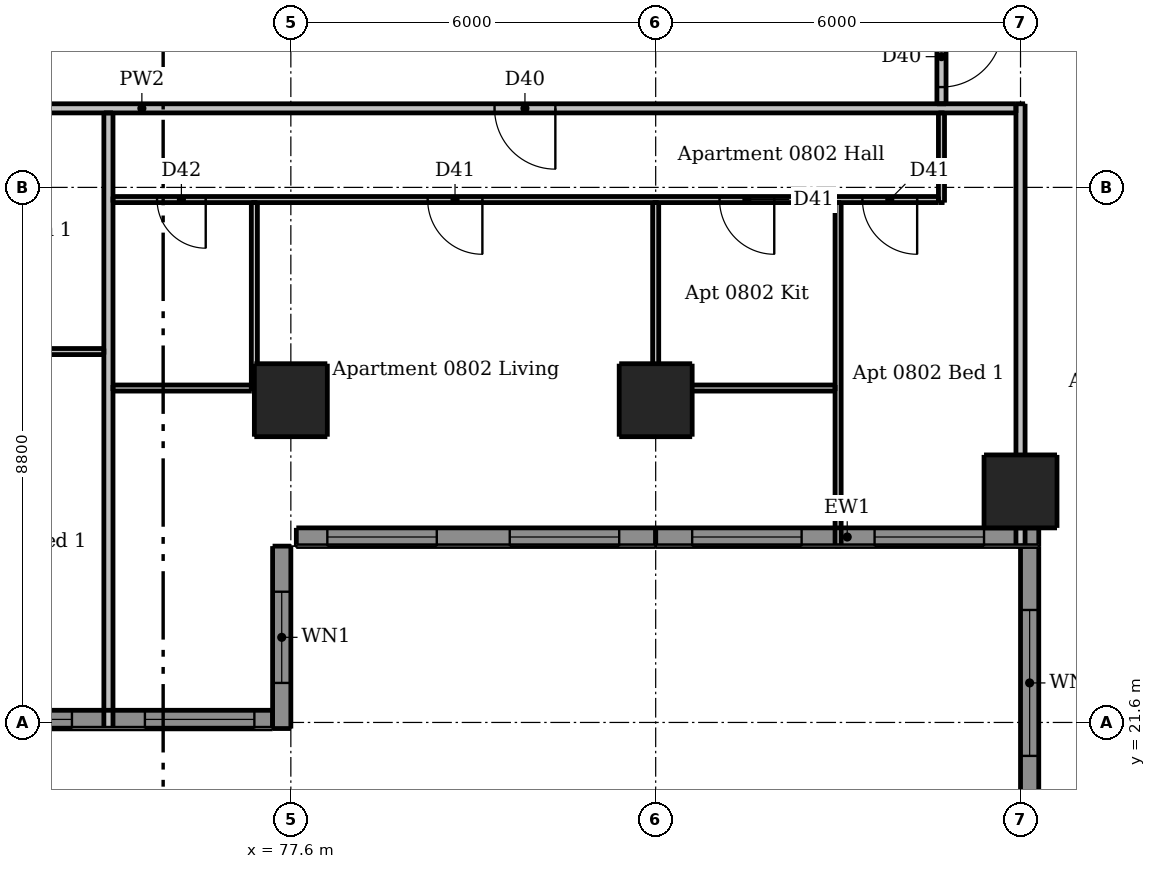
"""IFC4 building model, lengths in metres.
Left out: names, types, materials, properties, quantities, classifications, styles, units other than length and angle.
Written with IfcOpenShell. Run it as: python <this file> out.ifc"""

import sys

from ifc_helpers import new_model, si_unit, direction, frame, frame_2d, origin, origin_2d, place, context, subcontext, project, spatial, rectangle, extrude, element, fill, save


model = new_model("IFC4")
c1 = context("Model", 3, precision=1e-05, world=origin(), true_north=direction((0.0, 1.0)))
c2 = subcontext(c1, "Body", "Model", "MODEL_VIEW")
j1 = project(units=[si_unit("LENGTHUNIT", "METRE"), si_unit("PLANEANGLEUNIT", "RADIAN")], contexts=[c1])
p1 = place(None, origin())
s1 = spatial("IfcSite", under=j1, at=p1, CompositionType="ELEMENT")
p2 = place(p1, origin())
s2 = spatial("IfcBuilding", under=s1, at=p2, CompositionType="ELEMENT")
p3 = place(p2, frame((0.0, 0.0, 33.4)))
s3 = spatial("IfcBuildingStorey", under=s2, at=p3, CompositionType="ELEMENT", Elevation=33.4)
for number, where, z_axis, x_axis in (
    (1, (77.6, 26.9, 0.0), (0.0, 0.0, 1.0), (1.0, 0.0, 0.0)),
    (2, (83.6, 26.9, 0.0), (0.0, 0.0, 1.0), (1.0, 0.0, 0.0)),
    (3, (89.6, 25.4, 0.0), (0.0, 0.0, 1.0), (1.0, 0.0, 0.0)),
):
    element("IfcColumn", number, at=place(p3, frame(where, z_axis=z_axis, x_axis=x_axis)), inside=s3, PredefinedType="COLUMN", context=c2, shape_type="SweptSolid", body=[
        extrude(rectangle(XDim=1.2, YDim=1.2, at=origin_2d()), origin(), (0.0, 0.0, 1.0), 3.05),
    ])
p4 = place(p3, frame((77.45, 21.5, 0.0), z_axis=(0.0, 0.0, 1.0), x_axis=(0.0, 1.0, 0.0)))
e4 = element("IfcWall", 4, at=p4, inside=s3, PredefinedType="SOLIDWALL", context=c2, shape_type="SweptSolid", body=[
    extrude(rectangle(XDim=3.0, YDim=0.3, at=frame_2d((1.5, 0.0))), origin(), (0.0, 0.0, 1.0), 3.05),
])
p5 = place(p4, frame((0.75, 0.0, 0.9)))
e5 = element("IfcOpeningElement", 5, at=p5, cuts=e4, PredefinedType="OPENING", context=c2, shape_type="SweptSolid", body=[
    extrude(rectangle(XDim=1.5, YDim=1.5, at=frame_2d((0.75, 0.75))), frame((0.0, 0.16, 0.0), z_axis=(0.0, -1.0, 0.0), x_axis=(1.0, 0.0, 0.0)), (0.0, 0.0, 1.0), 0.32),
])
p6 = place(p3, frame((89.75, 24.5, 0.0), z_axis=(0.0, 0.0, 1.0), x_axis=(0.0, -1.0, 0.0)))
e6 = element("IfcWall", 6, at=p6, inside=s3, PredefinedType="SOLIDWALL", context=c2, shape_type="SweptSolid", body=[
    extrude(rectangle(XDim=4.5, YDim=0.3, at=frame_2d((2.25, 0.0))), origin(), (0.0, 0.0, 1.0), 3.05),
])
p7 = place(p6, frame((1.05, 0.0, 0.15)))
e7 = element("IfcOpeningElement", 7, at=p7, cuts=e6, PredefinedType="OPENING", context=c2, shape_type="SweptSolid", body=[
    extrude(rectangle(XDim=2.4, YDim=2.1, at=frame_2d((1.2, 1.05))), frame((0.0, 0.16, 0.0), z_axis=(0.0, -1.0, 0.0), x_axis=(1.0, 0.0, 0.0)), (0.0, 0.0, 1.0), 0.32),
])
p8 = place(p3, frame((71.6, 21.65, 0.0), z_axis=(0.0, 0.0, 1.0), x_axis=(1.0, 0.0, 0.0)))
e8 = element("IfcWall", 8, at=p8, inside=s3, PredefinedType="SOLIDWALL", context=c2, shape_type="SweptSolid", body=[
    extrude(rectangle(XDim=5.7, YDim=0.3, at=frame_2d((2.85, 0.0))), origin(), (0.0, 0.0, 1.0), 3.05),
])
p9 = place(p8, frame((0.6, 0.0, 0.15)))
e9 = element("IfcOpeningElement", 9, at=p9, cuts=e8, PredefinedType="OPENING", context=c2, shape_type="SweptSolid", body=[
    extrude(rectangle(XDim=1.8, YDim=2.1, at=frame_2d((0.9, 1.05))), frame((0.0, 0.16, 0.0), z_axis=(0.0, -1.0, 0.0), x_axis=(1.0, 0.0, 0.0)), (0.0, 0.0, 1.0), 0.32),
])
p10 = place(p8, frame((3.6, 0.0, 0.15)))
e10 = element("IfcOpeningElement", 10, at=p10, cuts=e8, PredefinedType="OPENING", context=c2, shape_type="SweptSolid", body=[
    extrude(rectangle(XDim=1.8, YDim=2.1, at=frame_2d((0.9, 1.05))), frame((0.0, 0.16, 0.0), z_axis=(0.0, -1.0, 0.0), x_axis=(1.0, 0.0, 0.0)), (0.0, 0.0, 1.0), 0.32),
])
p11 = place(p3, frame((77.69, 24.65, 0.0), z_axis=(0.0, 0.0, 1.0), x_axis=(1.0, 0.0, 0.0)))
e11 = element("IfcWall", 11, at=p11, inside=s3, PredefinedType="SOLIDWALL", context=c2, shape_type="SweptSolid", body=[
    extrude(rectangle(XDim=5.91, YDim=0.3, at=frame_2d((2.955, 0.0))), origin(), (0.0, 0.0, 1.0), 3.05),
])
p12 = place(p11, frame((0.51, 0.0, 0.15)))
e12 = element("IfcOpeningElement", 12, at=p12, cuts=e11, PredefinedType="OPENING", context=c2, shape_type="SweptSolid", body=[
    extrude(rectangle(XDim=1.8, YDim=2.1, at=frame_2d((0.9, 1.05))), frame((0.0, 0.16, 0.0), z_axis=(0.0, -1.0, 0.0), x_axis=(1.0, 0.0, 0.0)), (0.0, 0.0, 1.0), 0.32),
])
p13 = place(p11, frame((3.51, 0.0, 0.15)))
e13 = element("IfcOpeningElement", 13, at=p13, cuts=e11, PredefinedType="OPENING", context=c2, shape_type="SweptSolid", body=[
    extrude(rectangle(XDim=1.8, YDim=2.1, at=frame_2d((0.9, 1.05))), frame((0.0, 0.16, 0.0), z_axis=(0.0, -1.0, 0.0), x_axis=(1.0, 0.0, 0.0)), (0.0, 0.0, 1.0), 0.32),
])
p14 = place(p3, frame((83.6, 24.65, 0.0), z_axis=(0.0, 0.0, 1.0), x_axis=(1.0, 0.0, 0.0)))
e14 = element("IfcWall", 14, at=p14, inside=s3, PredefinedType="SOLIDWALL", context=c2, shape_type="SweptSolid", body=[
    extrude(rectangle(XDim=6.3, YDim=0.3, at=frame_2d((3.15, 0.0))), origin(), (0.0, 0.0, 1.0), 3.05),
])
p15 = place(p14, frame((0.6, 0.0, 0.15)))
e15 = element("IfcOpeningElement", 15, at=p15, cuts=e14, PredefinedType="OPENING", context=c2, shape_type="SweptSolid", body=[
    extrude(rectangle(XDim=1.8, YDim=2.1, at=frame_2d((0.9, 1.05))), frame((0.0, 0.16, 0.0), z_axis=(0.0, -1.0, 0.0), x_axis=(1.0, 0.0, 0.0)), (0.0, 0.0, 1.0), 0.32),
])
p16 = place(p14, frame((3.6, 0.0, 0.15)))
e16 = element("IfcOpeningElement", 16, at=p16, cuts=e14, PredefinedType="OPENING", context=c2, shape_type="SweptSolid", body=[
    extrude(rectangle(XDim=1.8, YDim=2.1, at=frame_2d((0.9, 1.05))), frame((0.0, 0.16, 0.0), z_axis=(0.0, -1.0, 0.0), x_axis=(1.0, 0.0, 0.0)), (0.0, 0.0, 1.0), 0.32),
])
p17 = place(p3, frame((77.0, 27.05, 0.0), z_axis=(0.0, 0.0, 1.0), x_axis=(0.0, 1.0, 0.0)))
e17 = element("IfcWall", 17, at=p17, inside=s3, PredefinedType="PARTITIONING", context=c2, shape_type="SweptSolid", body=[
    extrude(rectangle(XDim=3.1, YDim=0.1, at=frame_2d((1.55, 0.0))), origin(), (0.0, 0.0, 1.0), 3.05),
])
p18 = place(p3, frame((83.6, 27.05, 0.0), z_axis=(0.0, 0.0, 1.0), x_axis=(0.0, 1.0, 0.0)))
e18 = element("IfcWall", 18, at=p18, inside=s3, PredefinedType="PARTITIONING", context=c2, shape_type="SweptSolid", body=[
    extrude(rectangle(XDim=3.1, YDim=0.1, at=frame_2d((1.55, 0.0))), origin(), (0.0, 0.0, 1.0), 2.647),
])
p19 = place(p3, frame((86.6, 24.5, 0.0), z_axis=(0.0, 0.0, 1.0), x_axis=(0.0, 1.0, 0.0)))
e19 = element("IfcWall", 19, at=p19, inside=s3, PredefinedType="PARTITIONING", context=c2, shape_type="SweptSolid", body=[
    extrude(rectangle(XDim=5.65, YDim=0.1, at=frame_2d((2.825, 0.0))), origin(), (0.0, 0.0, 1.0), 3.05),
])
p20 = place(p3, frame((88.3, 30.15, 0.0), z_axis=(0.0, 0.0, 1.0), x_axis=(0.0, 1.0, 0.0)))
e20 = element("IfcWall", 20, at=p20, inside=s3, PredefinedType="PARTITIONING", context=c2, shape_type="SweptSolid", body=[
    extrude(rectangle(XDim=1.475, YDim=0.1, at=frame_2d((0.738, 0.0))), origin(), (0.0, 0.0, 1.0), 3.05),
])
p21 = place(p3, frame((88.25, 30.2, 0.0), z_axis=(0.0, 0.0, 1.0), x_axis=(-1.0, 0.0, 0.0)))
e21 = element("IfcWall", 21, at=p21, inside=s3, PredefinedType="PARTITIONING", context=c2, shape_type="SweptSolid", body=[
    extrude(rectangle(XDim=13.575, YDim=0.1, at=frame_2d((6.788, 0.0))), origin(), (0.0, 0.0, 1.0), 3.05),
])
p22 = place(p21, frame((7.5, 0.0, 0.0)))
e22 = element("IfcOpeningElement", 22, at=p22, cuts=e21, PredefinedType="OPENING", context=c2, shape_type="SweptSolid", body=[
    extrude(rectangle(XDim=0.9, YDim=2.1, at=frame_2d((0.45, 1.05))), frame((0.0, 0.06, 0.0), z_axis=(0.0, -1.0, 0.0), x_axis=(1.0, 0.0, 0.0)), (0.0, 0.0, 1.0), 0.12),
])
p23 = place(p21, frame((2.7, 0.0, 0.0)))
e23 = element("IfcOpeningElement", 23, at=p23, cuts=e21, PredefinedType="OPENING", context=c2, shape_type="SweptSolid", body=[
    extrude(rectangle(XDim=0.9, YDim=2.1, at=frame_2d((0.45, 1.05))), frame((0.0, 0.06, 0.0), z_axis=(0.0, -1.0, 0.0), x_axis=(1.0, 0.0, 0.0)), (0.0, 0.0, 1.0), 0.12),
])
p24 = place(p21, frame((0.35, 0.0, 0.0)))
e24 = element("IfcOpeningElement", 24, at=p24, cuts=e21, PredefinedType="OPENING", context=c2, shape_type="SweptSolid", body=[
    extrude(rectangle(XDim=0.9, YDim=2.1, at=frame_2d((0.45, 1.05))), frame((0.0, 0.06, 0.0), z_axis=(0.0, -1.0, 0.0), x_axis=(1.0, 0.0, 0.0)), (0.0, 0.0, 1.0), 0.12),
])
p25 = place(p21, frame((12.05, 0.0, 0.0)))
e25 = element("IfcOpeningElement", 25, at=p25, cuts=e21, PredefinedType="OPENING", context=c2, shape_type="SweptSolid", body=[
    extrude(rectangle(XDim=0.8, YDim=2.1, at=frame_2d((0.4, 1.05))), frame((0.0, 0.06, 0.0), z_axis=(0.0, -1.0, 0.0), x_axis=(1.0, 0.0, 0.0)), (0.0, 0.0, 1.0), 0.12),
])
p26 = place(p3, frame((68.45, 27.7, 0.0), z_axis=(0.0, 0.0, 1.0), x_axis=(1.0, 0.0, 0.0)))
e26 = element("IfcWall", 26, at=p26, inside=s3, PredefinedType="PARTITIONING", context=c2, shape_type="SweptSolid", body=[
    extrude(rectangle(XDim=6.075, YDim=0.1, at=frame_2d((3.038, 0.0))), origin(), (0.0, 0.0, 1.0), 3.05),
])
p27 = place(p26, frame((3.85, 0.0, 0.0)))
e27 = element("IfcOpeningElement", 27, at=p27, cuts=e26, PredefinedType="OPENING", context=c2, shape_type="SweptSolid", body=[
    extrude(rectangle(XDim=0.8, YDim=2.1, at=frame_2d((0.4, 1.05))), frame((0.0, 0.06, 0.0), z_axis=(0.0, -1.0, 0.0), x_axis=(1.0, 0.0, 0.0)), (0.0, 0.0, 1.0), 0.12),
])
p28 = place(p3, frame((74.675, 27.1, 0.0), z_axis=(0.0, 0.0, 1.0), x_axis=(1.0, 0.0, 0.0)))
e28 = element("IfcWall", 28, at=p28, inside=s3, PredefinedType="PARTITIONING", context=c2, shape_type="SweptSolid", body=[
    extrude(rectangle(XDim=2.275, YDim=0.1, at=frame_2d((1.137, 0.0))), origin(), (0.0, 0.0, 1.0), 3.05),
])
p29 = place(p3, frame((83.65, 27.1, 0.0), z_axis=(0.0, 0.0, 1.0), x_axis=(1.0, 0.0, 0.0)))
e29 = element("IfcWall", 29, at=p29, inside=s3, PredefinedType="PARTITIONING", context=c2, shape_type="SweptSolid", body=[
    extrude(rectangle(XDim=2.9, YDim=0.1, at=frame_2d((1.45, 0.0))), origin(), (0.0, 0.0, 1.0), 3.05),
])
p30 = place(p3, frame((74.6, 21.5, 0.0), z_axis=(0.0, 0.0, 1.0), x_axis=(0.0, 1.0, 0.0)))
e30 = element("IfcWall", 30, at=p30, inside=s3, PredefinedType="PARTITIONING", context=c2, shape_type="SweptSolid", body=[
    extrude(rectangle(XDim=10.125, YDim=0.15, at=frame_2d((5.062, 0.0))), origin(), (0.0, 0.0, 1.0), 3.05),
])
p31 = place(p3, frame((88.3, 60.475, 0.0), z_axis=(0.0, 0.0, 1.0), x_axis=(0.0, -1.0, 0.0)))
e31 = element("IfcWall", 31, at=p31, inside=s3, PredefinedType="PARTITIONING", context=c2, shape_type="SweptSolid", body=[
    extrude(rectangle(XDim=28.7, YDim=0.15, at=frame_2d((14.35, 0.0))), origin(), (0.0, 0.0, 1.0), 3.05),
])
p32 = place(p31, frame((27.425, 0.0, 0.0)))
e32 = element("IfcOpeningElement", 32, at=p32, cuts=e31, PredefinedType="OPENING", context=c2, shape_type="SweptSolid", body=[
    extrude(rectangle(XDim=1.0, YDim=2.1, at=frame_2d((0.5, 1.05))), frame((0.0, 0.085, 0.0), z_axis=(0.0, -1.0, 0.0), x_axis=(1.0, 0.0, 0.0)), (0.0, 0.0, 1.0), 0.17),
])
p33 = place(p31, frame((10.625, 0.0, 0.0)))
e33 = element("IfcOpeningElement", 33, at=p33, cuts=e31, PredefinedType="OPENING", context=c2, shape_type="SweptSolid", body=[
    extrude(rectangle(XDim=1.0, YDim=2.1, at=frame_2d((0.5, 1.05))), frame((0.0, 0.085, 0.0), z_axis=(0.0, -1.0, 0.0), x_axis=(1.0, 0.0, 0.0)), (0.0, 0.0, 1.0), 0.17),
])
p34 = place(p3, frame((89.6, 24.5, 0.0), z_axis=(0.0, 0.0, 1.0), x_axis=(0.0, 1.0, 0.0)))
e34 = element("IfcWall", 34, at=p34, inside=s3, PredefinedType="PARTITIONING", context=c2, shape_type="SweptSolid", body=[
    extrude(rectangle(XDim=7.275, YDim=0.15, at=frame_2d((3.637, 0.0))), origin(), (0.0, 0.0, 1.0), 2.516),
])
p35 = place(p3, frame((89.525, 31.7, 0.0), z_axis=(0.0, 0.0, 1.0), x_axis=(-1.0, 0.0, 0.0)))
e35 = element("IfcWall", 35, at=p35, inside=s3, PredefinedType="PARTITIONING", context=c2, shape_type="SweptSolid", body=[
    extrude(rectangle(XDim=28.75, YDim=0.15, at=frame_2d((14.375, 0.0))), origin(), (0.0, 0.0, 1.0), 3.05),
])
p36 = place(p35, frame((24.475, 0.0, 0.0)))
e36 = element("IfcOpeningElement", 36, at=p36, cuts=e35, PredefinedType="OPENING", context=c2, shape_type="SweptSolid", body=[
    extrude(rectangle(XDim=1.0, YDim=2.1, at=frame_2d((0.5, 1.05))), frame((0.0, 0.085, 0.0), z_axis=(0.0, -1.0, 0.0), x_axis=(1.0, 0.0, 0.0)), (0.0, 0.0, 1.0), 0.17),
])
p37 = place(p35, frame((7.575, 0.0, 0.0)))
e37 = element("IfcOpeningElement", 37, at=p37, cuts=e35, PredefinedType="OPENING", context=c2, shape_type="SweptSolid", body=[
    extrude(rectangle(XDim=1.0, YDim=2.1, at=frame_2d((0.5, 1.05))), frame((0.0, 0.085, 0.0), z_axis=(0.0, -1.0, 0.0), x_axis=(1.0, 0.0, 0.0)), (0.0, 0.0, 1.0), 0.17),
])
p38 = place(p5, origin())
e38 = element("IfcWindow", 38, at=p38, inside=s3, PartitioningType="DOUBLE_PANEL_VERTICAL", PredefinedType="WINDOW", context=c2, shape_type="SweptSolid", body=[
    extrude(rectangle(XDim=1.5, YDim=1.5, at=frame_2d((0.75, 0.75))), frame((0.0, 0.03, 0.0), z_axis=(0.0, -1.0, 0.0), x_axis=(1.0, 0.0, 0.0)), (0.0, 0.0, 1.0), 0.06),
])
fill(e5, e38)
p39 = place(p7, origin())
e39 = element("IfcWindow", 39, at=p39, inside=s3, PartitioningType="DOUBLE_PANEL_VERTICAL", PredefinedType="WINDOW", context=c2, shape_type="SweptSolid", body=[
    extrude(rectangle(XDim=2.4, YDim=2.1, at=frame_2d((1.2, 1.05))), frame((0.0, 0.03, 0.0), z_axis=(0.0, -1.0, 0.0), x_axis=(1.0, 0.0, 0.0)), (0.0, 0.0, 1.0), 0.06),
])
fill(e7, e39)
p40 = place(p9, origin())
e40 = element("IfcWindow", 40, at=p40, inside=s3, PartitioningType="DOUBLE_PANEL_VERTICAL", PredefinedType="WINDOW", context=c2, shape_type="SweptSolid", body=[
    extrude(rectangle(XDim=1.8, YDim=2.1, at=frame_2d((0.9, 1.05))), frame((0.0, 0.03, 0.0), z_axis=(0.0, -1.0, 0.0), x_axis=(1.0, 0.0, 0.0)), (0.0, 0.0, 1.0), 0.06),
])
fill(e9, e40)
p41 = place(p10, origin())
e41 = element("IfcWindow", 41, at=p41, inside=s3, PartitioningType="DOUBLE_PANEL_VERTICAL", PredefinedType="WINDOW", context=c2, shape_type="SweptSolid", body=[
    extrude(rectangle(XDim=1.8, YDim=2.1, at=frame_2d((0.9, 1.05))), frame((0.0, 0.03, 0.0), z_axis=(0.0, -1.0, 0.0), x_axis=(1.0, 0.0, 0.0)), (0.0, 0.0, 1.0), 0.06),
])
fill(e10, e41)
p42 = place(p12, origin())
e42 = element("IfcWindow", 42, at=p42, inside=s3, PartitioningType="DOUBLE_PANEL_VERTICAL", PredefinedType="WINDOW", context=c2, shape_type="SweptSolid", body=[
    extrude(rectangle(XDim=1.8, YDim=2.1, at=frame_2d((0.9, 1.05))), frame((0.0, 0.03, 0.0), z_axis=(0.0, -1.0, 0.0), x_axis=(1.0, 0.0, 0.0)), (0.0, 0.0, 1.0), 0.06),
])
fill(e12, e42)
p43 = place(p13, origin())
e43 = element("IfcWindow", 43, at=p43, inside=s3, PartitioningType="DOUBLE_PANEL_VERTICAL", PredefinedType="WINDOW", context=c2, shape_type="SweptSolid", body=[
    extrude(rectangle(XDim=1.8, YDim=2.1, at=frame_2d((0.9, 1.05))), frame((0.0, 0.03, 0.0), z_axis=(0.0, -1.0, 0.0), x_axis=(1.0, 0.0, 0.0)), (0.0, 0.0, 1.0), 0.06),
])
fill(e13, e43)
p44 = place(p15, origin())
e44 = element("IfcWindow", 44, at=p44, inside=s3, PartitioningType="DOUBLE_PANEL_VERTICAL", PredefinedType="WINDOW", context=c2, shape_type="SweptSolid", body=[
    extrude(rectangle(XDim=1.8, YDim=2.1, at=frame_2d((0.9, 1.05))), frame((0.0, 0.03, 0.0), z_axis=(0.0, -1.0, 0.0), x_axis=(1.0, 0.0, 0.0)), (0.0, 0.0, 1.0), 0.06),
])
fill(e15, e44)
p45 = place(p16, origin())
e45 = element("IfcWindow", 45, at=p45, inside=s3, PartitioningType="DOUBLE_PANEL_VERTICAL", PredefinedType="WINDOW", context=c2, shape_type="SweptSolid", body=[
    extrude(rectangle(XDim=1.8, YDim=2.1, at=frame_2d((0.9, 1.05))), frame((0.0, 0.03, 0.0), z_axis=(0.0, -1.0, 0.0), x_axis=(1.0, 0.0, 0.0)), (0.0, 0.0, 1.0), 0.06),
])
fill(e16, e45)
p46 = place(p37, origin())
e46 = element("IfcDoor", 46, at=p46, inside=s3, OperationType="SINGLE_SWING_LEFT", PredefinedType="DOOR", context=c2, shape_type="SweptSolid", body=[
    extrude(rectangle(XDim=1.0, YDim=2.1, at=frame_2d((0.5, 1.05))), frame((0.0, 0.025, 0.0), z_axis=(0.0, -1.0, 0.0), x_axis=(1.0, 0.0, 0.0)), (0.0, 0.0, 1.0), 0.05),
])
fill(e37, e46)
p47 = place(p22, origin())
e47 = element("IfcDoor", 47, at=p47, inside=s3, OperationType="SINGLE_SWING_LEFT", PredefinedType="DOOR", context=c2, shape_type="SweptSolid", body=[
    extrude(rectangle(XDim=0.9, YDim=2.1, at=frame_2d((0.45, 1.05))), frame((0.0, 0.025, 0.0), z_axis=(0.0, -1.0, 0.0), x_axis=(1.0, 0.0, 0.0)), (0.0, 0.0, 1.0), 0.05),
])
fill(e22, e47)
p48 = place(p23, origin())
e48 = element("IfcDoor", 48, at=p48, inside=s3, OperationType="SINGLE_SWING_LEFT", PredefinedType="DOOR", context=c2, shape_type="SweptSolid", body=[
    extrude(rectangle(XDim=0.9, YDim=2.1, at=frame_2d((0.45, 1.05))), frame((0.0, 0.025, 0.0), z_axis=(0.0, -1.0, 0.0), x_axis=(1.0, 0.0, 0.0)), (0.0, 0.0, 1.0), 0.05),
])
fill(e23, e48)
p49 = place(p24, origin())
e49 = element("IfcDoor", 49, at=p49, inside=s3, OperationType="SINGLE_SWING_LEFT", PredefinedType="DOOR", context=c2, shape_type="SweptSolid", body=[
    extrude(rectangle(XDim=0.9, YDim=2.1, at=frame_2d((0.45, 1.05))), frame((0.0, 0.025, 0.0), z_axis=(0.0, -1.0, 0.0), x_axis=(1.0, 0.0, 0.0)), (0.0, 0.0, 1.0), 0.05),
])
fill(e24, e49)
p50 = place(p25, origin())
e50 = element("IfcDoor", 50, at=p50, inside=s3, OperationType="SINGLE_SWING_LEFT", PredefinedType="DOOR", context=c2, shape_type="SweptSolid", body=[
    extrude(rectangle(XDim=0.8, YDim=2.1, at=frame_2d((0.4, 1.05))), frame((0.0, 0.025, 0.0), z_axis=(0.0, -1.0, 0.0), x_axis=(1.0, 0.0, 0.0)), (0.0, 0.0, 1.0), 0.05),
])
fill(e25, e50)
p51 = place(p32, origin())
e51 = element("IfcDoor", 51, at=p51, inside=s3, OperationType="SINGLE_SWING_LEFT", PredefinedType="DOOR", context=c2, shape_type="SweptSolid", body=[
    extrude(rectangle(XDim=1.0, YDim=2.1, at=frame_2d((0.5, 1.05))), frame((0.0, 0.025, 0.0), z_axis=(0.0, -1.0, 0.0), x_axis=(1.0, 0.0, 0.0)), (0.0, 0.0, 1.0), 0.05),
])
fill(e32, e51)
save(model, sys.argv[1])
